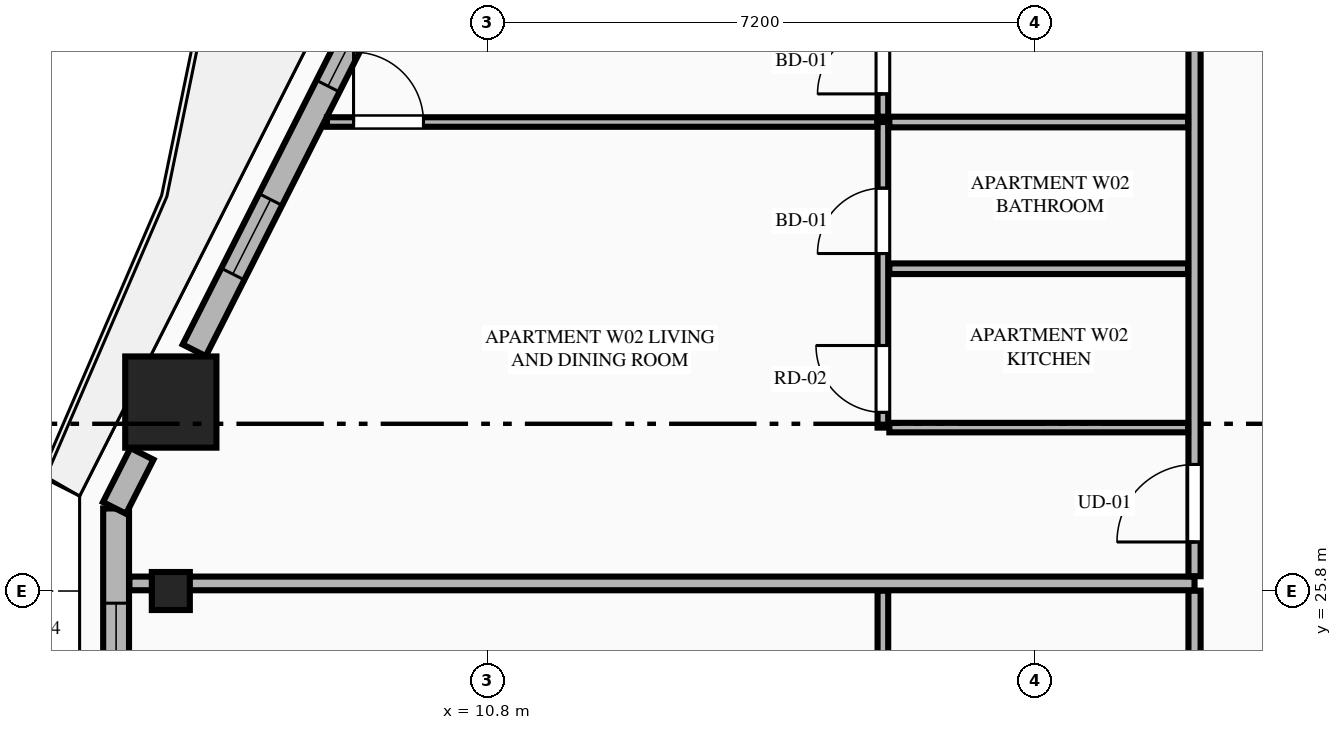
"""IFC4 building model, lengths in metres.
Left out: names, types, materials, properties, quantities, classifications, styles, units other than length and angle.
Written with IfcOpenShell. Run it as: python <this file> out.ifc"""

import sys

from ifc_helpers import new_model, si_unit, direction, frame, frame_2d, origin, origin_2d, place, context, subcontext, project, spatial, rectangle, extrude, element, fill, save


model = new_model("IFC4")
c1 = context("Model", 3, precision=1e-05, world=origin(), true_north=direction((0.0, 1.0)))
c2 = subcontext(c1, "Body", "Model", "MODEL_VIEW")
j1 = project(units=[si_unit("LENGTHUNIT", "METRE"), si_unit("PLANEANGLEUNIT", "RADIAN")], contexts=[c1])
p1 = place(None, origin())
s1 = spatial("IfcSite", under=j1, at=p1, CompositionType="ELEMENT")
p2 = place(p1, origin())
s2 = spatial("IfcBuilding", under=s1, at=p2, CompositionType="ELEMENT")
p3 = place(p2, frame((0.0, 0.0, 28.45)))
s3 = spatial("IfcBuildingStorey", under=s2, at=p3, CompositionType="ELEMENT", Elevation=28.45)
p4 = place(p3, frame((6.632, 28.286, 0.0), z_axis=(0.0, 0.0, 1.0), x_axis=(1.0, 0.0, 0.0)))
e1 = element("IfcColumn", 1, at=p4, inside=s3, PredefinedType="COLUMN", context=c2, shape_type="SweptSolid", body=[
    extrude(rectangle(XDim=1.2, YDim=1.2, at=origin_2d()), origin(), (0.0, 0.0, 1.0), 3.55),
])
p5 = place(p3, frame((6.632, 25.8, 0.0), z_axis=(0.0, 0.0, 1.0), x_axis=(0.0, -1.0, 0.0)))
e2 = element("IfcColumn", 2, at=p5, inside=s3, PredefinedType="PILASTER", context=c2, shape_type="SweptSolid", body=[
    extrude(rectangle(XDim=0.5, YDim=0.35, at=origin_2d()), origin(), (0.0, 0.0, 1.0), 3.55),
])
p6 = place(p3, frame((5.912, 26.886, 0.0), z_axis=(0.0, 0.0, 1.0), x_axis=(0.0, -1.0, 0.0)))
e3 = element("IfcWall", 3, at=p6, inside=s3, PredefinedType="STANDARD", context=c2, shape_type="SweptSolid", body=[
    extrude(rectangle(XDim=2.172, YDim=0.34, at=frame_2d((1.086, 0.0))), origin(), (0.0, 0.0, 1.0), 3.33),
])
p7 = place(p6, frame((1.246, 0.0, 0.75)))
e4 = element("IfcOpeningElement", 4, at=p7, cuts=e3, PredefinedType="OPENING", context=c2, shape_type="SweptSolid", body=[
    extrude(rectangle(XDim=0.686, YDim=2.0, at=frame_2d((0.343, 1.0))), frame((0.0, 0.18, 0.0), z_axis=(0.0, -1.0, 0.0), x_axis=(1.0, 0.0, 0.0)), (0.0, 0.0, 1.0), 0.36),
])
p8 = place(p3, frame((9.335, 33.699, 0.0), z_axis=(0.0, 0.0, 1.0), x_axis=(-0.451590635984, -0.892225250422, 0.0)))
e5 = element("IfcWall", 5, at=p8, inside=s3, PredefinedType="STANDARD", context=c2, shape_type="SweptSolid", body=[
    extrude(rectangle(XDim=5.303, YDim=0.34, at=frame_2d((2.652, 0.0))), origin(), (0.0, 0.0, 1.0), 2.787),
])
p9 = place(p8, frame((0.308, 0.0, 0.75)))
e6 = element("IfcOpeningElement", 6, at=p9, cuts=e5, PredefinedType="OPENING", context=c2, shape_type="SweptSolid", body=[
    extrude(rectangle(XDim=1.1, YDim=1.887, at=frame_2d((0.55, 0.943))), frame((0.0, 0.18, 0.0), z_axis=(0.0, -1.0, 0.0), x_axis=(1.0, 0.0, 0.0)), (0.0, 0.0, 1.0), 0.36),
])
p10 = place(p8, frame((3.08, 0.0, 0.75)))
e7 = element("IfcOpeningElement", 7, at=p10, cuts=e5, PredefinedType="OPENING", context=c2, shape_type="SweptSolid", body=[
    extrude(rectangle(XDim=1.1, YDim=1.887, at=frame_2d((0.55, 0.943))), frame((0.0, 0.18, 0.0), z_axis=(0.0, -1.0, 0.0), x_axis=(1.0, 0.0, 0.0)), (0.0, 0.0, 1.0), 0.36),
])
p11 = place(p3, frame((6.252, 27.605, 0.0), z_axis=(0.0, 0.0, 1.0), x_axis=(-0.452101093511, -0.891966704113, 0.0)))
e8 = element("IfcWall", 8, at=p11, inside=s3, PredefinedType="STANDARD", context=c2, shape_type="SweptSolid", body=[
    extrude(rectangle(XDim=0.798, YDim=0.34, at=frame_2d((0.399, 0.0))), origin(), (0.0, 0.0, 1.0), 3.33),
])
p12 = place(p3, frame((20.1, 16.045, 0.0), z_axis=(0.0, 0.0, 1.0), x_axis=(0.0, 1.0, 0.0)))
e9 = element("IfcWall", 9, at=p12, inside=s3, PredefinedType="PARTITIONING", context=c2, shape_type="SweptSolid", body=[
    extrude(rectangle(XDim=9.76, YDim=0.16, at=frame_2d((4.88, 0.0))), origin(), (0.0, 0.0, 1.0), 2.7),
])
p13 = place(p12, frame((0.45, 0.0, 0.0)))
e10 = element("IfcOpeningElement", 10, at=p13, cuts=e9, PredefinedType="OPENING", context=c2, shape_type="SweptSolid", body=[
    extrude(rectangle(XDim=1.02, YDim=2.25, at=frame_2d((0.51, 1.125))), frame((0.0, 0.09, 0.0), z_axis=(0.0, -1.0, 0.0), x_axis=(1.0, 0.0, 0.0)), (0.0, 0.0, 1.0), 0.18),
])
p14 = place(p3, frame((16.0, 22.12, 0.0), z_axis=(0.0, 0.0, 1.0), x_axis=(0.0, 1.0, 0.0)))
e11 = element("IfcWall", 11, at=p14, inside=s3, PredefinedType="PLUMBINGWALL", context=c2, shape_type="SweptSolid", body=[
    extrude(rectangle(XDim=3.685, YDim=0.14, at=frame_2d((1.842, 0.0))), origin(), (0.0, 0.0, 1.0), 3.33),
])
p15 = place(p14, frame((0.3, 0.0, 0.0)))
e12 = element("IfcOpeningElement", 12, at=p15, cuts=e11, PredefinedType="OPENING", context=c2, shape_type="SweptSolid", body=[
    extrude(rectangle(XDim=0.86, YDim=2.1, at=frame_2d((0.43, 1.05))), frame((0.0, 0.08, 0.0), z_axis=(0.0, -1.0, 0.0), x_axis=(1.0, 0.0, 0.0)), (0.0, 0.0, 1.0), 0.16),
])
p16 = place(p3, frame((6.087, 25.9, 0.0), z_axis=(0.0, 0.0, 1.0), x_axis=(1.0, 0.0, 0.0)))
e13 = element("IfcWall", 13, at=p16, inside=s3, PredefinedType="PARTITIONING", context=c2, shape_type="SweptSolid", body=[
    extrude(rectangle(XDim=14.013, YDim=0.18, at=frame_2d((7.007, 0.0))), origin(), (0.0, 0.0, 1.0), 3.33),
])
p17 = place(p3, frame((20.1, 25.995, 0.0), z_axis=(0.0, 0.0, 1.0), x_axis=(0.0, 1.0, 0.0)))
e14 = element("IfcWall", 14, at=p17, inside=s3, PredefinedType="PARTITIONING", context=c2, shape_type="SweptSolid", body=[
    extrude(rectangle(XDim=9.76, YDim=0.16, at=frame_2d((4.88, 0.0))), origin(), (0.0, 0.0, 1.0), 2.7),
])
p18 = place(p17, frame((0.45, 0.0, 0.0)))
e15 = element("IfcOpeningElement", 15, at=p18, cuts=e14, PredefinedType="OPENING", context=c2, shape_type="SweptSolid", body=[
    extrude(rectangle(XDim=1.02, YDim=2.25, at=frame_2d((0.51, 1.125))), frame((0.0, 0.09, 0.0), z_axis=(0.0, -1.0, 0.0), x_axis=(1.0, 0.0, 0.0)), (0.0, 0.0, 1.0), 0.18),
])
p19 = place(p3, frame((16.085, 27.95, 0.0), z_axis=(0.0, 0.0, 1.0), x_axis=(1.0, 0.0, 0.0)))
e16 = element("IfcWall", 16, at=p19, inside=s3, PredefinedType="PARTITIONING", context=c2, shape_type="SweptSolid", body=[
    extrude(rectangle(XDim=3.93, YDim=0.125, at=frame_2d((1.965, 0.0))), origin(), (0.0, 0.0, 1.0), 3.33),
])
p20 = place(p3, frame((16.0, 27.95, 0.0), z_axis=(0.0, 0.0, 1.0), x_axis=(0.0, 1.0, 0.0)))
e17 = element("IfcWall", 17, at=p20, inside=s3, PredefinedType="PLUMBINGWALL", context=c2, shape_type="SweptSolid", body=[
    extrude(rectangle(XDim=4.02, YDim=0.14, at=frame_2d((2.01, 0.0))), origin(), (0.0, 0.0, 1.0), 3.33),
])
p21 = place(p20, frame((0.2, 0.0, 0.0)))
e18 = element("IfcOpeningElement", 18, at=p21, cuts=e17, PredefinedType="OPENING", context=c2, shape_type="SweptSolid", body=[
    extrude(rectangle(XDim=0.88, YDim=2.15, at=frame_2d((0.44, 1.075))), frame((0.0, 0.08, 0.0), z_axis=(0.0, -1.0, 0.0), x_axis=(1.0, 0.0, 0.0)), (0.0, 0.0, 1.0), 0.16),
])
p22 = place(p20, frame((2.29, 0.0, 0.0)))
e19 = element("IfcOpeningElement", 19, at=p22, cuts=e17, PredefinedType="OPENING", context=c2, shape_type="SweptSolid", body=[
    extrude(rectangle(XDim=0.86, YDim=2.1, at=frame_2d((0.43, 1.05))), frame((0.0, 0.08, 0.0), z_axis=(0.0, -1.0, 0.0), x_axis=(1.0, 0.0, 0.0)), (0.0, 0.0, 1.0), 0.16),
])
p23 = place(p3, frame((16.0, 32.04, 0.0), z_axis=(0.0, 0.0, 1.0), x_axis=(0.0, 1.0, 0.0)))
e20 = element("IfcWall", 20, at=p23, inside=s3, PredefinedType="PLUMBINGWALL", context=c2, shape_type="SweptSolid", body=[
    extrude(rectangle(XDim=3.715, YDim=0.14, at=frame_2d((1.857, 0.0))), origin(), (0.0, 0.0, 1.0), 3.33),
])
p24 = place(p23, frame((0.3, 0.0, 0.0)))
e21 = element("IfcOpeningElement", 21, at=p24, cuts=e20, PredefinedType="OPENING", context=c2, shape_type="SweptSolid", body=[
    extrude(rectangle(XDim=0.86, YDim=2.1, at=frame_2d((0.43, 1.05))), frame((0.0, 0.08, 0.0), z_axis=(0.0, -1.0, 0.0), x_axis=(1.0, 0.0, 0.0)), (0.0, 0.0, 1.0), 0.16),
])
p25 = place(p3, frame((16.085, 31.97, 0.0), z_axis=(0.0, 0.0, 1.0), x_axis=(1.0, 0.0, 0.0)))
e22 = element("IfcWall", 22, at=p25, inside=s3, PredefinedType="PLUMBINGWALL", context=c2, shape_type="SweptSolid", body=[
    extrude(rectangle(XDim=3.93, YDim=0.14, at=frame_2d((1.965, 0.0))), origin(), (0.0, 0.0, 1.0), 3.33),
])
p26 = place(p3, frame((8.686, 31.97, 0.0), z_axis=(0.0, 0.0, 1.0), x_axis=(1.0, 0.0, 0.0)))
e23 = element("IfcWall", 23, at=p26, inside=s3, PredefinedType="PARTITIONING", context=c2, shape_type="SweptSolid", body=[
    extrude(rectangle(XDim=7.239, YDim=0.125, at=frame_2d((3.62, 0.0))), origin(), (0.0, 0.0, 1.0), 3.33),
])
p27 = place(p26, frame((0.35, 0.0, 0.0)))
e24 = element("IfcOpeningElement", 24, at=p27, cuts=e23, PredefinedType="OPENING", context=c2, shape_type="SweptSolid", body=[
    extrude(rectangle(XDim=0.92, YDim=2.15, at=frame_2d((0.46, 1.075))), frame((0.0, 0.073, 0.0), z_axis=(0.0, -1.0, 0.0), x_axis=(1.0, 0.0, 0.0)), (0.0, 0.0, 1.0), 0.145),
])
p28 = place(p3, frame((16.085, 30.04, 0.0), z_axis=(0.0, 0.0, 1.0), x_axis=(1.0, 0.0, 0.0)))
e25 = element("IfcWall", 25, at=p28, inside=s3, PredefinedType="PLUMBINGWALL", context=c2, shape_type="SweptSolid", body=[
    extrude(rectangle(XDim=3.93, YDim=0.14, at=frame_2d((1.965, 0.0))), origin(), (0.0, 0.0, 1.0), 3.33),
])
p29 = place(p9, origin())
e26 = element("IfcWindow", 26, at=p29, inside=s3, PartitioningType="SINGLE_PANEL", PredefinedType="WINDOW", context=c2, shape_type="SweptSolid", body=[
    extrude(rectangle(XDim=1.1, YDim=1.887, at=frame_2d((0.55, 0.943))), frame((0.0, 0.03, 0.0), z_axis=(0.0, -1.0, 0.0), x_axis=(1.0, 0.0, 0.0)), (0.0, 0.0, 1.0), 0.06),
])
fill(e6, e26)
p30 = place(p21, origin())
e27 = element("IfcDoor", 27, at=p30, inside=s3, OperationType="SINGLE_SWING_RIGHT", PredefinedType="DOOR", context=c2, shape_type="SweptSolid", body=[
    extrude(rectangle(XDim=0.88, YDim=2.15, at=frame_2d((0.44, 1.075))), frame((0.0, 0.025, 0.0), z_axis=(0.0, -1.0, 0.0), x_axis=(1.0, 0.0, 0.0)), (0.0, 0.0, 1.0), 0.05),
])
fill(e18, e27)
p31 = place(p22, origin())
e28 = element("IfcDoor", 28, at=p31, inside=s3, OperationType="SINGLE_SWING_LEFT", PredefinedType="DOOR", context=c2, shape_type="SweptSolid", body=[
    extrude(rectangle(XDim=0.86, YDim=2.1, at=frame_2d((0.43, 1.05))), frame((0.0, 0.025, 0.0), z_axis=(0.0, -1.0, 0.0), x_axis=(1.0, 0.0, 0.0)), (0.0, 0.0, 1.0), 0.05),
])
fill(e19, e28)
p32 = place(p24, origin())
e29 = element("IfcDoor", 29, at=p32, inside=s3, OperationType="SINGLE_SWING_LEFT", PredefinedType="DOOR", context=c2, shape_type="SweptSolid", body=[
    extrude(rectangle(XDim=0.86, YDim=2.1, at=frame_2d((0.43, 1.05))), frame((0.0, 0.025, 0.0), z_axis=(0.0, -1.0, 0.0), x_axis=(1.0, 0.0, 0.0)), (0.0, 0.0, 1.0), 0.05),
])
fill(e21, e29)
p33 = place(p18, origin())
e30 = element("IfcDoor", 30, at=p33, inside=s3, OperationType="SINGLE_SWING_LEFT", PredefinedType="DOOR", context=c2, shape_type="SweptSolid", body=[
    extrude(rectangle(XDim=1.02, YDim=2.25, at=frame_2d((0.51, 1.125))), frame((0.0, 0.025, 0.0), z_axis=(0.0, -1.0, 0.0), x_axis=(1.0, 0.0, 0.0)), (0.0, 0.0, 1.0), 0.05),
])
fill(e15, e30)
p34 = place(p27, origin())
e31 = element("IfcDoor", 31, at=p34, inside=s3, OperationType="SINGLE_SWING_LEFT", PredefinedType="DOOR", context=c2, shape_type="SweptSolid", body=[
    extrude(rectangle(XDim=0.92, YDim=2.15, at=frame_2d((0.46, 1.075))), frame((0.0, 0.025, 0.0), z_axis=(0.0, -1.0, 0.0), x_axis=(1.0, 0.0, 0.0)), (0.0, 0.0, 1.0), 0.05),
])
fill(e24, e31)
p35 = place(p10, origin())
e32 = element("IfcWindow", 32, at=p35, inside=s3, PartitioningType="SINGLE_PANEL", PredefinedType="WINDOW", context=c2, shape_type="SweptSolid", body=[
    extrude(rectangle(XDim=1.1, YDim=1.887, at=frame_2d((0.55, 0.943))), frame((0.0, 0.03, 0.0), z_axis=(0.0, -1.0, 0.0), x_axis=(1.0, 0.0, 0.0)), (0.0, 0.0, 1.0), 0.06),
])
fill(e7, e32)
p36 = place(p7, origin())
e33 = element("IfcWindow", 33, at=p36, inside=s3, PartitioningType="SINGLE_PANEL", PredefinedType="WINDOW", context=c2, shape_type="SweptSolid", body=[
    extrude(rectangle(XDim=0.686, YDim=2.0, at=frame_2d((0.343, 1.0))), frame((0.0, 0.03, 0.0), z_axis=(0.0, -1.0, 0.0), x_axis=(1.0, 0.0, 0.0)), (0.0, 0.0, 1.0), 0.06),
])
fill(e4, e33)
save(model, sys.argv[1])
